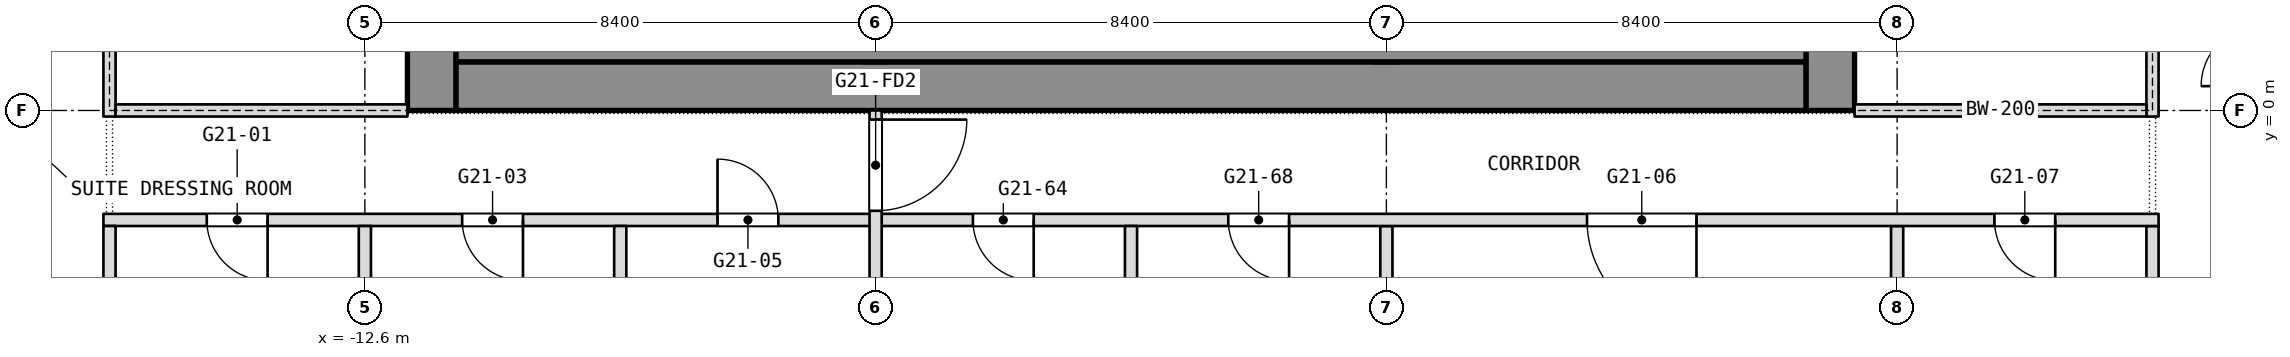
"""IFC4 building model, lengths in metres.
Left out: names, types, materials, properties, quantities, classifications, styles, units other than length and angle.
Written with IfcOpenShell. Run it as: python <this file> out.ifc"""

import sys

from ifc_helpers import new_model, si_unit, direction, frame, frame_2d, origin, place, context, subcontext, project, spatial, rectangle, extrude, element, fill, save


model = new_model("IFC4")
c1 = context("Model", 3, precision=1e-05, world=origin(), true_north=direction((0.0, 1.0)))
c2 = subcontext(c1, "Body", "Model", "MODEL_VIEW")
j1 = project(units=[si_unit("LENGTHUNIT", "METRE"), si_unit("PLANEANGLEUNIT", "RADIAN")], contexts=[c1])
p1 = place(None, origin())
s1 = spatial("IfcSite", under=j1, at=p1, CompositionType="ELEMENT")
p2 = place(p1, origin())
s2 = spatial("IfcBuilding", under=s1, at=p2, CompositionType="ELEMENT")
p3 = place(p2, frame((0.0, 0.0, 241.7)))
s3 = spatial("IfcBuildingStorey", under=s2, at=p3, CompositionType="ELEMENT", Elevation=241.7)
p4 = place(p3, frame((11.5, 0.0, 0.0), z_axis=(0.0, 0.0, 1.0), x_axis=(0.0, 1.0, 0.0)))
e1 = element("IfcWall", 1, at=p4, inside=s3, PredefinedType="SHEAR", context=c2, shape_type="SweptSolid", body=[
    extrude(rectangle(XDim=16.8, YDim=0.8, at=frame_2d((8.4, 0.0))), origin(), (0.0, 0.0, 1.0), 3.6),
])
p5 = place(p4, frame((2.3, 0.0, 0.0)))
e2 = element("IfcOpeningElement", 2, at=p5, cuts=e1, PredefinedType="OPENING", context=c2, shape_type="SweptSolid", body=[
    extrude(rectangle(XDim=1.1, YDim=2.1, at=frame_2d((0.55, 1.05))), frame((0.0, 0.4, 0.0), z_axis=(0.0, -1.0, 0.0), x_axis=(1.0, 0.0, 0.0)), (0.0, 0.0, 1.0), 0.8),
])
p6 = place(p4, frame((4.85, 0.0, 0.0)))
e3 = element("IfcOpeningElement", 3, at=p6, cuts=e1, PredefinedType="OPENING", context=c2, shape_type="SweptSolid", body=[
    extrude(rectangle(XDim=1.1, YDim=2.1, at=frame_2d((0.55, 1.05))), frame((0.0, 0.4, 0.0), z_axis=(0.0, -1.0, 0.0), x_axis=(1.0, 0.0, 0.0)), (0.0, 0.0, 1.0), 0.8),
])
p7 = place(p4, frame((6.825, 0.0, 0.0)))
e4 = element("IfcOpeningElement", 4, at=p7, cuts=e1, PredefinedType="OPENING", context=c2, shape_type="SweptSolid", body=[
    extrude(rectangle(XDim=1.2, YDim=2.1, at=frame_2d((0.6, 1.05))), frame((0.0, 0.4, 0.0), z_axis=(0.0, -1.0, 0.0), x_axis=(1.0, 0.0, 0.0)), (0.0, 0.0, 1.0), 0.8),
])
p8 = place(p4, frame((13.4, 0.0, 0.0)))
e5 = element("IfcOpeningElement", 5, at=p8, cuts=e1, PredefinedType="OPENING", context=c2, shape_type="SweptSolid", body=[
    extrude(rectangle(XDim=1.1, YDim=2.1, at=frame_2d((0.55, 1.05))), frame((0.0, 0.4, 0.0), z_axis=(0.0, -1.0, 0.0), x_axis=(1.0, 0.0, 0.0)), (0.0, 0.0, 1.0), 0.8),
])
p9 = place(p4, frame((10.85, 0.0, 0.0)))
e6 = element("IfcOpeningElement", 6, at=p9, cuts=e1, PredefinedType="OPENING", context=c2, shape_type="SweptSolid", body=[
    extrude(rectangle(XDim=1.1, YDim=2.1, at=frame_2d((0.55, 1.05))), frame((0.0, 0.4, 0.0), z_axis=(0.0, -1.0, 0.0), x_axis=(1.0, 0.0, 0.0)), (0.0, 0.0, 1.0), 0.8),
])
p10 = place(p4, frame((8.775, 0.0, 0.0)))
e7 = element("IfcOpeningElement", 7, at=p10, cuts=e1, PredefinedType="OPENING", context=c2, shape_type="SweptSolid", body=[
    extrude(rectangle(XDim=1.2, YDim=2.1, at=frame_2d((0.6, 1.05))), frame((0.0, 0.4, 0.0), z_axis=(0.0, -1.0, 0.0), x_axis=(1.0, 0.0, 0.0)), (0.0, 0.0, 1.0), 0.8),
])
p11 = place(p3, frame((-11.5, 0.0, 0.0), z_axis=(0.0, 0.0, 1.0), x_axis=(0.0, 1.0, 0.0)))
e8 = element("IfcWall", 8, at=p11, inside=s3, PredefinedType="SHEAR", context=c2, shape_type="SweptSolid", body=[
    extrude(rectangle(XDim=16.8, YDim=0.8, at=frame_2d((8.4, 0.0))), origin(), (0.0, 0.0, 1.0), 3.6),
])
p12 = place(p11, frame((1.837, 0.0, 0.0)))
e9 = element("IfcOpeningElement", 9, at=p12, cuts=e8, PredefinedType="OPENING", context=c2, shape_type="SweptSolid", body=[
    extrude(rectangle(XDim=0.9, YDim=2.1, at=frame_2d((0.45, 1.05))), frame((0.0, 0.4, 0.0), z_axis=(0.0, -1.0, 0.0), x_axis=(1.0, 0.0, 0.0)), (0.0, 0.0, 1.0), 0.8),
])
p13 = place(p11, frame((4.462, 0.0, 0.0)))
e10 = element("IfcOpeningElement", 10, at=p13, cuts=e8, PredefinedType="OPENING", context=c2, shape_type="SweptSolid", body=[
    extrude(rectangle(XDim=0.9, YDim=2.1, at=frame_2d((0.45, 1.05))), frame((0.0, 0.4, 0.0), z_axis=(0.0, -1.0, 0.0), x_axis=(1.0, 0.0, 0.0)), (0.0, 0.0, 1.0), 0.8),
])
p14 = place(p11, frame((6.825, 0.0, 0.0)))
e11 = element("IfcOpeningElement", 11, at=p14, cuts=e8, PredefinedType="OPENING", context=c2, shape_type="SweptSolid", body=[
    extrude(rectangle(XDim=1.2, YDim=2.1, at=frame_2d((0.6, 1.05))), frame((0.0, 0.4, 0.0), z_axis=(0.0, -1.0, 0.0), x_axis=(1.0, 0.0, 0.0)), (0.0, 0.0, 1.0), 0.8),
])
p15 = place(p11, frame((12.3, 0.0, 0.0)))
e12 = element("IfcOpeningElement", 12, at=p15, cuts=e8, PredefinedType="OPENING", context=c2, shape_type="SweptSolid", body=[
    extrude(rectangle(XDim=0.9, YDim=2.1, at=frame_2d((0.45, 1.05))), frame((0.0, 0.4, 0.0), z_axis=(0.0, -1.0, 0.0), x_axis=(1.0, 0.0, 0.0)), (0.0, 0.0, 1.0), 0.8),
])
p16 = place(p11, frame((8.775, 0.0, 0.0)))
e13 = element("IfcOpeningElement", 13, at=p16, cuts=e8, PredefinedType="OPENING", context=c2, shape_type="SweptSolid", body=[
    extrude(rectangle(XDim=1.2, YDim=2.1, at=frame_2d((0.6, 1.05))), frame((0.0, 0.4, 0.0), z_axis=(0.0, -1.0, 0.0), x_axis=(1.0, 0.0, 0.0)), (0.0, 0.0, 1.0), 0.8),
])
p17 = place(p3, frame((-11.1, 0.4, 0.0), z_axis=(0.0, 0.0, 1.0), x_axis=(1.0, 0.0, 0.0)))
e14 = element("IfcWall", 14, at=p17, inside=s3, PredefinedType="SHEAR", context=c2, shape_type="SweptSolid", body=[
    extrude(rectangle(XDim=22.2, YDim=0.8, at=frame_2d((11.1, 0.0))), origin(), (0.0, 0.0, 1.0), 3.6),
])
p18 = place(p3, frame((-4.2, 0.8, 0.0), z_axis=(0.0, 0.0, 1.0), x_axis=(0.0, 1.0, 0.0)))
e15 = element("IfcWall", 15, at=p18, inside=s3, PredefinedType="SHEAR", context=c2, shape_type="SweptSolid", body=[
    extrude(rectangle(XDim=15.2, YDim=0.4, at=frame_2d((7.6, 0.0))), origin(), (0.0, 0.0, 1.0), 3.6),
])
p19 = place(p18, frame((8.5, 0.0, 0.0)))
e16 = element("IfcOpeningElement", 16, at=p19, cuts=e15, PredefinedType="OPENING", context=c2, shape_type="SweptSolid", body=[
    extrude(rectangle(XDim=1.2, YDim=2.1, at=frame_2d((0.6, 1.05))), frame((0.0, 0.2, 0.0), z_axis=(0.0, -1.0, 0.0), x_axis=(1.0, 0.0, 0.0)), (0.0, 0.0, 1.0), 0.4),
])
p20 = place(p3, frame((4.2, 0.8, 0.0), z_axis=(0.0, 0.0, 1.0), x_axis=(0.0, 1.0, 0.0)))
e17 = element("IfcWall", 17, at=p20, inside=s3, PredefinedType="SHEAR", context=c2, shape_type="SweptSolid", body=[
    extrude(rectangle(XDim=15.2, YDim=0.4, at=frame_2d((7.6, 0.0))), origin(), (0.0, 0.0, 1.0), 3.6),
])
p21 = place(p20, frame((5.95, 0.0, 0.0)))
e18 = element("IfcOpeningElement", 18, at=p21, cuts=e17, PredefinedType="OPENING", context=c2, shape_type="SweptSolid", body=[
    extrude(rectangle(XDim=1.2, YDim=2.1, at=frame_2d((0.6, 1.05))), frame((0.0, 0.2, 0.0), z_axis=(0.0, -1.0, 0.0), x_axis=(1.0, 0.0, 0.0)), (0.0, 0.0, 1.0), 0.4),
])
for number, where, z_axis, x_axis in (
    (19, (16.8, -7.8, 0.0), (0.0, 0.0, 1.0), (0.0, 1.0, 0.0)),
    (20, (12.6, -7.8, 0.0), (0.0, 0.0, 1.0), (0.0, 1.0, 0.0)),
):
    element("IfcWall", number, at=place(p3, frame(where, z_axis=z_axis, x_axis=x_axis)), inside=s3, PredefinedType="PARTITIONING", context=c2, shape_type="SweptSolid", body=[
        extrude(rectangle(XDim=5.9, YDim=0.2, at=frame_2d((2.95, 0.0))), origin(), (0.0, 0.0, 1.0), 3.34),
    ])
p22 = place(p3, frame((4.2, -11.6, 0.0), z_axis=(0.0, 0.0, 1.0), x_axis=(0.0, 1.0, 0.0)))
e21 = element("IfcWall", 21, at=p22, inside=s3, PredefinedType="PARTITIONING", context=c2, shape_type="SweptSolid", body=[
    extrude(rectangle(XDim=9.7, YDim=0.2, at=frame_2d((4.85, 0.0))), origin(), (0.0, 0.0, 1.0), 3.34),
])
p23 = place(p3, frame((-16.9, -1.8, 0.0), z_axis=(0.0, 0.0, 1.0), x_axis=(1.0, 0.0, 0.0)))
e22 = element("IfcWall", 22, at=p23, inside=s3, PredefinedType="PARTITIONING", context=c2, shape_type="SweptSolid", body=[
    extrude(rectangle(XDim=33.8, YDim=0.2, at=frame_2d((16.9, 0.0))), origin(), (0.0, 0.0, 1.0), 3.34),
])
p24 = place(p23, frame((1.7, 0.0, 0.0)))
e23 = element("IfcOpeningElement", 23, at=p24, cuts=e22, PredefinedType="OPENING", context=c2, shape_type="SweptSolid", body=[
    extrude(rectangle(XDim=1.0, YDim=2.1, at=frame_2d((0.5, 1.05))), frame((0.0, 0.1, 0.0), z_axis=(0.0, -1.0, 0.0), x_axis=(1.0, 0.0, 0.0)), (0.0, 0.0, 1.0), 0.2),
])
p25 = place(p23, frame((5.9, 0.0, 0.0)))
e24 = element("IfcOpeningElement", 24, at=p25, cuts=e22, PredefinedType="OPENING", context=c2, shape_type="SweptSolid", body=[
    extrude(rectangle(XDim=1.0, YDim=2.1, at=frame_2d((0.5, 1.05))), frame((0.0, 0.1, 0.0), z_axis=(0.0, -1.0, 0.0), x_axis=(1.0, 0.0, 0.0)), (0.0, 0.0, 1.0), 0.2),
])
p26 = place(p23, frame((10.1, 0.0, 0.0)))
e25 = element("IfcOpeningElement", 25, at=p26, cuts=e22, PredefinedType="OPENING", context=c2, shape_type="SweptSolid", body=[
    extrude(rectangle(XDim=1.0, YDim=2.1, at=frame_2d((0.5, 1.05))), frame((0.0, 0.1, 0.0), z_axis=(0.0, -1.0, 0.0), x_axis=(1.0, 0.0, 0.0)), (0.0, 0.0, 1.0), 0.2),
])
p27 = place(p23, frame((24.4, 0.0, 0.0)))
e26 = element("IfcOpeningElement", 26, at=p27, cuts=e22, PredefinedType="OPENING", context=c2, shape_type="SweptSolid", body=[
    extrude(rectangle(XDim=1.8, YDim=2.1, at=frame_2d((0.9, 1.05))), frame((0.0, 0.1, 0.0), z_axis=(0.0, -1.0, 0.0), x_axis=(1.0, 0.0, 0.0)), (0.0, 0.0, 1.0), 0.2),
])
p28 = place(p23, frame((31.1, 0.0, 0.0)))
e27 = element("IfcOpeningElement", 27, at=p28, cuts=e22, PredefinedType="OPENING", context=c2, shape_type="SweptSolid", body=[
    extrude(rectangle(XDim=1.0, YDim=2.1, at=frame_2d((0.5, 1.05))), frame((0.0, 0.1, 0.0), z_axis=(0.0, -1.0, 0.0), x_axis=(1.0, 0.0, 0.0)), (0.0, 0.0, 1.0), 0.2),
])
p29 = place(p23, frame((14.3, 0.0, 0.0)))
e28 = element("IfcOpeningElement", 28, at=p29, cuts=e22, PredefinedType="OPENING", context=c2, shape_type="SweptSolid", body=[
    extrude(rectangle(XDim=1.0, YDim=2.1, at=frame_2d((0.5, 1.05))), frame((0.0, 0.1, 0.0), z_axis=(0.0, -1.0, 0.0), x_axis=(1.0, 0.0, 0.0)), (0.0, 0.0, 1.0), 0.2),
])
p30 = place(p23, frame((18.5, 0.0, 0.0)))
e29 = element("IfcOpeningElement", 29, at=p30, cuts=e22, PredefinedType="OPENING", context=c2, shape_type="SweptSolid", body=[
    extrude(rectangle(XDim=1.0, YDim=2.1, at=frame_2d((0.5, 1.05))), frame((0.0, 0.1, 0.0), z_axis=(0.0, -1.0, 0.0), x_axis=(1.0, 0.0, 0.0)), (0.0, 0.0, 1.0), 0.2),
])
p31 = place(p3, frame((0.0, -11.6, 0.0), z_axis=(0.0, 0.0, 1.0), x_axis=(0.0, 1.0, 0.0)))
e30 = element("IfcWall", 30, at=p31, inside=s3, PredefinedType="PARTITIONING", context=c2, shape_type="SweptSolid", body=[
    extrude(rectangle(XDim=9.7, YDim=0.2, at=frame_2d((4.85, 0.0))), origin(), (0.0, 0.0, 1.0), 3.34),
])
p32 = place(p3, frame((-4.2, -13.6, 0.0), z_axis=(0.0, 0.0, 1.0), x_axis=(0.0, 1.0, 0.0)))
e31 = element("IfcWall", 31, at=p32, inside=s3, PredefinedType="PARTITIONING", context=c2, shape_type="SweptSolid", body=[
    extrude(rectangle(XDim=13.6, YDim=0.2, at=frame_2d((6.8, 0.0))), origin(), (0.0, 0.0, 1.0), 3.34),
])
p33 = place(p32, frame((11.95, 0.0, 0.0)))
e32 = element("IfcOpeningElement", 32, at=p33, cuts=e31, PredefinedType="OPENING", context=c2, shape_type="SweptSolid", body=[
    extrude(rectangle(XDim=1.5, YDim=2.1, at=frame_2d((0.75, 1.05))), frame((0.0, 0.1, 0.0), z_axis=(0.0, -1.0, 0.0), x_axis=(1.0, 0.0, 0.0)), (0.0, 0.0, 1.0), 0.2),
])
p34 = place(p32, frame((0.25, 0.0, 0.0)))
e33 = element("IfcOpeningElement", 33, at=p34, cuts=e31, PredefinedType="OPENING", context=c2, shape_type="SweptSolid", body=[
    extrude(rectangle(XDim=1.5, YDim=2.1, at=frame_2d((0.75, 1.05))), frame((0.0, 0.1, 0.0), z_axis=(0.0, -1.0, 0.0), x_axis=(1.0, 0.0, 0.0)), (0.0, 0.0, 1.0), 0.2),
])
p35 = place(p3, frame((-8.4, -8.0, 0.0), z_axis=(0.0, 0.0, 1.0), x_axis=(0.0, 1.0, 0.0)))
e34 = element("IfcWall", 34, at=p35, inside=s3, PredefinedType="PARTITIONING", context=c2, shape_type="SweptSolid", body=[
    extrude(rectangle(XDim=6.1, YDim=0.2, at=frame_2d((3.05, 0.0))), origin(), (0.0, 0.0, 1.0), 3.34),
])
p36 = place(p3, frame((-12.6, -7.8, 0.0), z_axis=(0.0, 0.0, 1.0), x_axis=(0.0, 1.0, 0.0)))
e35 = element("IfcWall", 35, at=p36, inside=s3, PredefinedType="PARTITIONING", context=c2, shape_type="SweptSolid", body=[
    extrude(rectangle(XDim=5.9, YDim=0.2, at=frame_2d((2.95, 0.0))), origin(), (0.0, 0.0, 1.0), 3.34),
])
p37 = place(p3, frame((-16.8, -8.0, 0.0), z_axis=(0.0, 0.0, 1.0), x_axis=(0.0, 1.0, 0.0)))
e36 = element("IfcWall", 36, at=p37, inside=s3, PredefinedType="PARTITIONING", context=c2, shape_type="SweptSolid", body=[
    extrude(rectangle(XDim=6.1, YDim=0.2, at=frame_2d((3.05, 0.0))), origin(), (0.0, 0.0, 1.0), 3.34),
])
p38 = place(p3, frame((-11.1, 1.15, 0.0), z_axis=(0.0, 0.0, 1.0), x_axis=(1.0, 0.0, 0.0)))
e37 = element("IfcWall", 37, at=p38, inside=s3, PredefinedType="PARTITIONING", context=c2, shape_type="SweptSolid", body=[
    extrude(rectangle(XDim=22.2, YDim=0.7, at=frame_2d((11.1, 0.0))), origin(), (0.0, 0.0, 1.0), 3.34),
])
p39 = place(p3, frame((-16.8, -0.1, 0.0), z_axis=(0.0, 0.0, 1.0), x_axis=(0.0, 1.0, 0.0)))
e38 = element("IfcWall", 38, at=p39, inside=s3, PredefinedType="PARTITIONING", context=c2, shape_type="SweptSolid", body=[
    extrude(rectangle(XDim=17.0, YDim=0.2, at=frame_2d((8.5, 0.0))), origin(), (0.0, 0.0, 1.0), 3.34),
])
p40 = place(p39, frame((2.2, 0.0, 0.0)))
e39 = element("IfcOpeningElement", 39, at=p40, cuts=e38, PredefinedType="OPENING", context=c2, shape_type="SweptSolid", body=[
    extrude(rectangle(XDim=1.8, YDim=2.1, at=frame_2d((0.9, 1.05))), frame((0.0, 0.1, 0.0), z_axis=(0.0, -1.0, 0.0), x_axis=(1.0, 0.0, 0.0)), (0.0, 0.0, 1.0), 0.2),
])
p41 = place(p39, frame((13.0, 0.0, 0.0)))
e40 = element("IfcOpeningElement", 40, at=p41, cuts=e38, PredefinedType="OPENING", context=c2, shape_type="SweptSolid", body=[
    extrude(rectangle(XDim=1.8, YDim=2.1, at=frame_2d((0.9, 1.05))), frame((0.0, 0.1, 0.0), z_axis=(0.0, -1.0, 0.0), x_axis=(1.0, 0.0, 0.0)), (0.0, 0.0, 1.0), 0.2),
])
p42 = place(p3, frame((-16.7, 0.0, 0.0), z_axis=(0.0, 0.0, 1.0), x_axis=(1.0, 0.0, 0.0)))
e41 = element("IfcWall", 41, at=p42, inside=s3, PredefinedType="PARTITIONING", context=c2, shape_type="SweptSolid", body=[
    extrude(rectangle(XDim=4.8, YDim=0.2, at=frame_2d((2.4, 0.0))), origin(), (0.0, 0.0, 1.0), 2.94),
])
p43 = place(p3, frame((16.8, -0.1, 0.0), z_axis=(0.0, 0.0, 1.0), x_axis=(0.0, 1.0, 0.0)))
e42 = element("IfcWall", 42, at=p43, inside=s3, PredefinedType="PARTITIONING", context=c2, shape_type="SweptSolid", body=[
    extrude(rectangle(XDim=17.0, YDim=0.2, at=frame_2d((8.5, 0.0))), origin(), (0.0, 0.0, 1.0), 3.34),
])
p44 = place(p43, frame((2.2, 0.0, 0.0)))
e43 = element("IfcOpeningElement", 43, at=p44, cuts=e42, PredefinedType="OPENING", context=c2, shape_type="SweptSolid", body=[
    extrude(rectangle(XDim=1.8, YDim=2.1, at=frame_2d((0.9, 1.05))), frame((0.0, 0.1, 0.0), z_axis=(0.0, -1.0, 0.0), x_axis=(1.0, 0.0, 0.0)), (0.0, 0.0, 1.0), 0.2),
])
p45 = place(p43, frame((13.0, 0.0, 0.0)))
e44 = element("IfcOpeningElement", 44, at=p45, cuts=e42, PredefinedType="OPENING", context=c2, shape_type="SweptSolid", body=[
    extrude(rectangle(XDim=1.8, YDim=2.1, at=frame_2d((0.9, 1.05))), frame((0.0, 0.1, 0.0), z_axis=(0.0, -1.0, 0.0), x_axis=(1.0, 0.0, 0.0)), (0.0, 0.0, 1.0), 0.2),
])
p46 = place(p3, frame((11.9, 0.0, 0.0), z_axis=(0.0, 0.0, 1.0), x_axis=(1.0, 0.0, 0.0)))
e45 = element("IfcWall", 45, at=p46, inside=s3, PredefinedType="PARTITIONING", context=c2, shape_type="SweptSolid", body=[
    extrude(rectangle(XDim=4.8, YDim=0.2, at=frame_2d((2.4, 0.0))), origin(), (0.0, 0.0, 1.0), 2.94),
])
p47 = place(p24, origin())
e46 = element("IfcDoor", 46, at=p47, inside=s3, OperationType="SINGLE_SWING_LEFT", PredefinedType="DOOR", context=c2, shape_type="SweptSolid", body=[
    extrude(rectangle(XDim=1.0, YDim=2.1, at=frame_2d((0.5, 1.05))), frame((0.0, 0.025, 0.0), z_axis=(0.0, -1.0, 0.0), x_axis=(1.0, 0.0, 0.0)), (0.0, 0.0, 1.0), 0.05),
])
fill(e23, e46)
p48 = place(p25, origin())
e47 = element("IfcDoor", 47, at=p48, inside=s3, OperationType="SINGLE_SWING_LEFT", PredefinedType="DOOR", context=c2, shape_type="SweptSolid", body=[
    extrude(rectangle(XDim=1.0, YDim=2.1, at=frame_2d((0.5, 1.05))), frame((0.0, 0.025, 0.0), z_axis=(0.0, -1.0, 0.0), x_axis=(1.0, 0.0, 0.0)), (0.0, 0.0, 1.0), 0.05),
])
fill(e24, e47)
p49 = place(p26, origin())
e48 = element("IfcDoor", 48, at=p49, inside=s3, OperationType="SINGLE_SWING_RIGHT", PredefinedType="DOOR", context=c2, shape_type="SweptSolid", body=[
    extrude(rectangle(XDim=1.0, YDim=2.1, at=frame_2d((0.5, 1.05))), frame((0.0, 0.025, 0.0), z_axis=(0.0, -1.0, 0.0), x_axis=(1.0, 0.0, 0.0)), (0.0, 0.0, 1.0), 0.05),
])
fill(e25, e48)
p50 = place(p27, origin())
e49 = element("IfcDoor", 49, at=p50, inside=s3, OperationType="DOUBLE_DOOR_SINGLE_SWING", PredefinedType="DOOR", context=c2, shape_type="SweptSolid", body=[
    extrude(rectangle(XDim=1.8, YDim=2.1, at=frame_2d((0.9, 1.05))), frame((0.0, 0.025, 0.0), z_axis=(0.0, -1.0, 0.0), x_axis=(1.0, 0.0, 0.0)), (0.0, 0.0, 1.0), 0.05),
])
fill(e26, e49)
p51 = place(p28, origin())
e50 = element("IfcDoor", 50, at=p51, inside=s3, OperationType="SINGLE_SWING_RIGHT", PredefinedType="DOOR", context=c2, shape_type="SweptSolid", body=[
    extrude(rectangle(XDim=1.0, YDim=2.1, at=frame_2d((0.5, 1.05))), frame((0.0, 0.025, 0.0), z_axis=(0.0, -1.0, 0.0), x_axis=(1.0, 0.0, 0.0)), (0.0, 0.0, 1.0), 0.05),
])
fill(e27, e50)
p52 = place(p29, origin())
e51 = element("IfcDoor", 51, at=p52, inside=s3, OperationType="SINGLE_SWING_LEFT", PredefinedType="DOOR", context=c2, shape_type="SweptSolid", body=[
    extrude(rectangle(XDim=1.0, YDim=2.1, at=frame_2d((0.5, 1.05))), frame((0.0, 0.025, 0.0), z_axis=(0.0, -1.0, 0.0), x_axis=(1.0, 0.0, 0.0)), (0.0, 0.0, 1.0), 0.05),
])
fill(e28, e51)
p53 = place(p30, origin())
e52 = element("IfcDoor", 52, at=p53, inside=s3, OperationType="SINGLE_SWING_LEFT", PredefinedType="DOOR", context=c2, shape_type="SweptSolid", body=[
    extrude(rectangle(XDim=1.0, YDim=2.1, at=frame_2d((0.5, 1.05))), frame((0.0, 0.025, 0.0), z_axis=(0.0, -1.0, 0.0), x_axis=(1.0, 0.0, 0.0)), (0.0, 0.0, 1.0), 0.05),
])
fill(e29, e52)
p54 = place(p33, origin())
e53 = element("IfcDoor", 53, at=p54, inside=s3, OperationType="DOUBLE_DOOR_DOUBLE_SWING", PredefinedType="DOOR", context=c2, shape_type="SweptSolid", body=[
    extrude(rectangle(XDim=1.5, YDim=2.1, at=frame_2d((0.75, 1.05))), frame((0.0, 0.025, 0.0), z_axis=(0.0, -1.0, 0.0), x_axis=(1.0, 0.0, 0.0)), (0.0, 0.0, 1.0), 0.05),
])
fill(e32, e53)
save(model, sys.argv[1])
